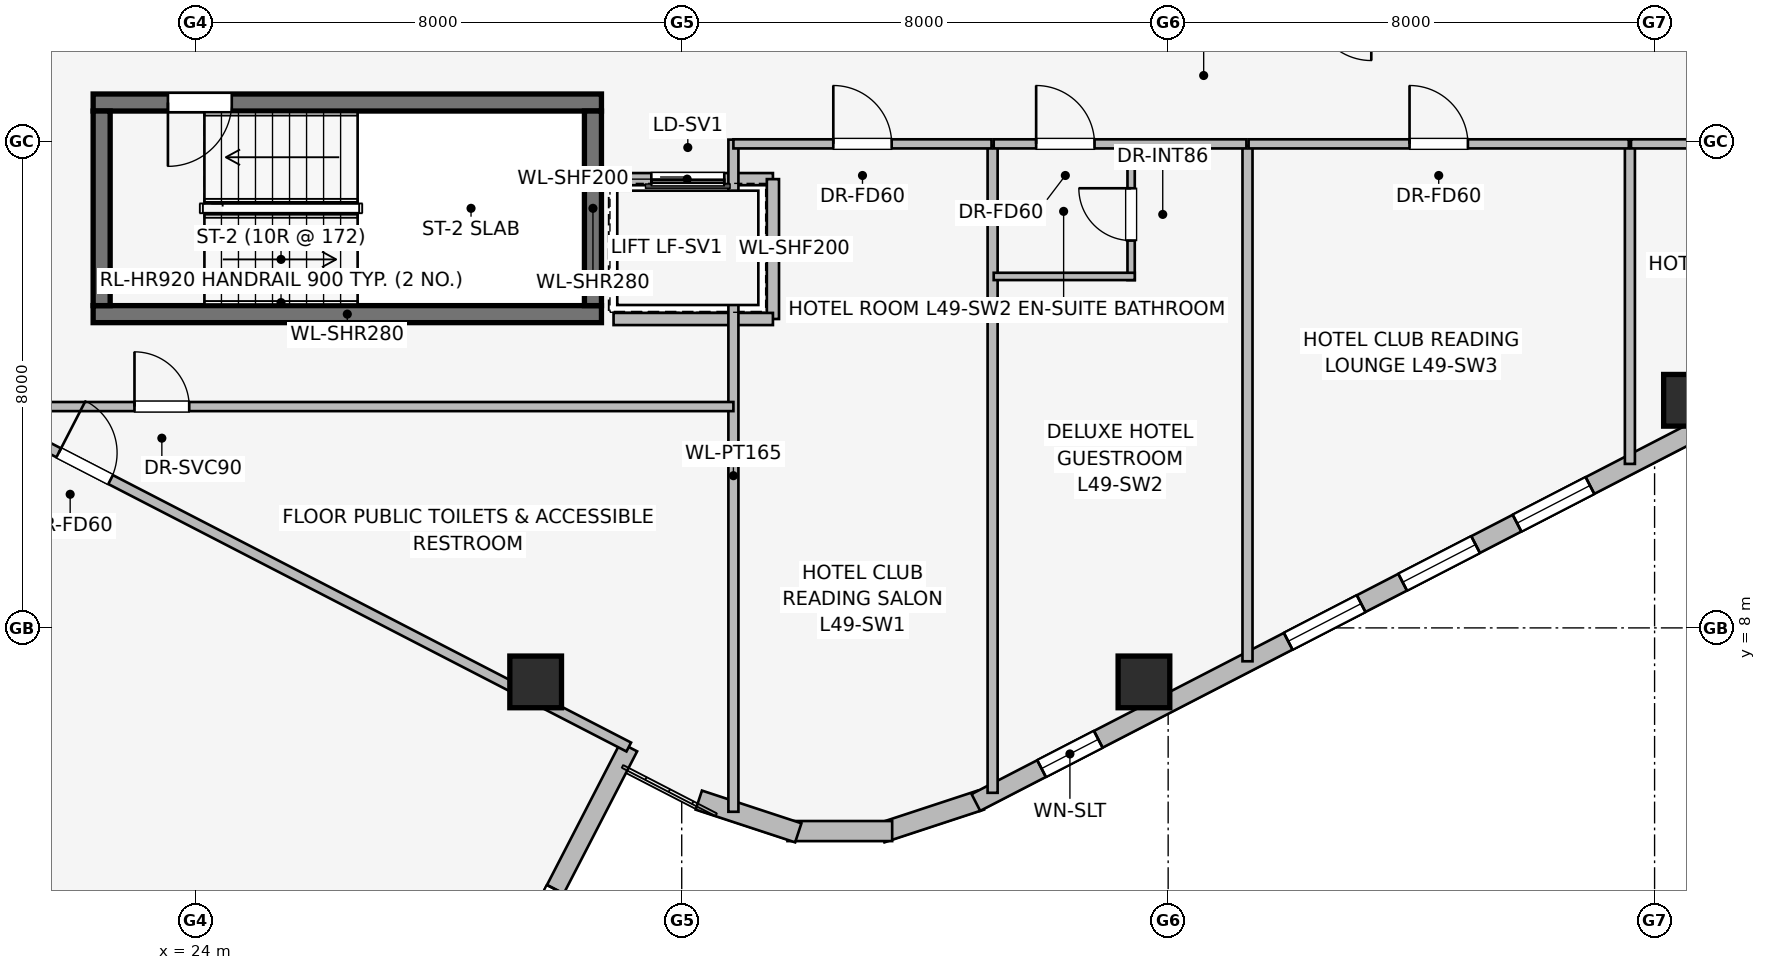
"""IFC4 building model, lengths in metres.
Left out: names, types, materials, properties, quantities, classifications, styles, units other than length and angle.
Written with IfcOpenShell. Run it as: python <this file> out.ifc"""

import sys

from ifc_helpers import new_model, si_unit, direction, frame, frame_2d, origin, origin_2d, place, context, subcontext, project, spatial, rectangle, extrude, element, fill, save


model = new_model("IFC4")
c1 = context("Model", 3, precision=1e-05, world=origin(), true_north=direction((0.0, 1.0)))
c2 = subcontext(c1, "Body", "Model", "MODEL_VIEW")
j1 = project(units=[si_unit("LENGTHUNIT", "METRE"), si_unit("PLANEANGLEUNIT", "RADIAN")], contexts=[c1])
p1 = place(None, origin())
s1 = spatial("IfcSite", under=j1, at=p1, CompositionType="ELEMENT")
p2 = place(p1, origin())
s2 = spatial("IfcBuilding", under=s1, at=p2, CompositionType="ELEMENT")
p3 = place(p2, frame((0.0, 0.0, 180.9)))
s3 = spatial("IfcBuildingStorey", under=s2, at=p3, CompositionType="ELEMENT", Elevation=180.9)
p4 = place(p3, frame((22.32, 13.16, 0.0), z_axis=(0.0, 0.0, 1.0), x_axis=(1.0, 0.0, 0.0)))
e1 = element("IfcWall", 1, at=p4, inside=s3, PredefinedType="SHEAR", context=c2, shape_type="SweptSolid", body=[
    extrude(rectangle(XDim=8.36, YDim=0.28, at=frame_2d((4.18, 0.0))), origin(), (0.0, 0.0, 1.0), 3.45),
])
p5 = place(p3, frame((30.68, 16.64, 0.0), z_axis=(0.0, 0.0, 1.0), x_axis=(-1.0, 0.0, 0.0)))
e2 = element("IfcWall", 2, at=p5, inside=s3, PredefinedType="SHEAR", context=c2, shape_type="SweptSolid", body=[
    extrude(rectangle(XDim=8.36, YDim=0.28, at=frame_2d((4.18, 0.0))), origin(), (0.0, 0.0, 1.0), 3.45),
])
p6 = place(p5, frame((6.08, 0.0, 0.0)))
e3 = element("IfcOpeningElement", 3, at=p6, cuts=e2, PredefinedType="OPENING", context=c2, shape_type="SweptSolid", body=[
    extrude(rectangle(XDim=1.05, YDim=2.0, at=frame_2d((0.525, 1.0))), frame((0.0, 0.15, 0.0), z_axis=(0.0, -1.0, 0.0), x_axis=(1.0, 0.0, 0.0)), (0.0, 0.0, 1.0), 0.3),
])
for number, where, z_axis, x_axis in (
    (4, (22.46, 16.5, 0.0), (0.0, 0.0, 1.0), (0.0, -1.0, 0.0)),
    (5, (30.54, 13.3, 0.0), (0.0, 0.0, 1.0), (0.0, 1.0, 0.0)),
):
    element("IfcWall", number, at=place(p3, frame(where, z_axis=z_axis, x_axis=x_axis)), inside=s3, PredefinedType="SHEAR", context=c2, shape_type="SweptSolid", body=[
        extrude(rectangle(XDim=3.2, YDim=0.28, at=frame_2d((1.6, 0.0))), origin(), (0.0, 0.0, 1.0), 3.45),
    ])
for number, where, z_axis, x_axis in (
    (6, (29.598, 7.112, 0.0), (0.0, 0.0, 1.0), (1.0, 0.0, 0.0)),
    (7, (39.602, 7.112, 0.0), (0.0, 0.0, 1.0), (1.0, 0.0, 0.0)),
    (8, (48.574, 11.743, 0.0), (0.0, 0.0, 1.0), (1.0, 0.0, 0.0)),
):
    element("IfcColumn", number, at=place(p3, frame(where, z_axis=z_axis, x_axis=x_axis)), inside=s3, PredefinedType="COLUMN", context=c2, shape_type="SweptSolid", body=[
        extrude(rectangle(XDim=0.85, YDim=0.85, at=origin_2d()), origin(), (0.0, 0.0, 1.0), 3.45),
    ])
p7 = place(p3, frame((31.129, 6.041, 0.0), z_axis=(0.0, 0.0, 1.0), x_axis=(-0.458626737826, -0.88862900884, 0.0)))
e9 = element("IfcWall", 9, at=p7, inside=s3, PredefinedType="STANDARD", context=c2, shape_type="SweptSolid", body=[
    extrude(rectangle(XDim=19.6, YDim=0.31, at=frame_2d((9.8, 0.0))), origin(), (0.0, 0.0, 1.0), 3.19),
])
p8 = place(p7, frame((2.633, 0.0, 0.75)))
e10 = element("IfcOpeningElement", 10, at=p8, cuts=e9, PredefinedType="OPENING", context=c2, shape_type="SweptSolid", body=[
    extrude(rectangle(XDim=2.0, YDim=1.5, at=frame_2d((1.0, 0.75))), frame((0.0, 0.165, 0.0), z_axis=(0.0, -1.0, 0.0), x_axis=(1.0, 0.0, 0.0)), (0.0, 0.0, 1.0), 0.33),
])
p9 = place(p7, frame((8.8, 0.0, 0.75)))
e11 = element("IfcOpeningElement", 11, at=p9, cuts=e9, PredefinedType="OPENING", context=c2, shape_type="SweptSolid", body=[
    extrude(rectangle(XDim=2.0, YDim=1.5, at=frame_2d((1.0, 0.75))), frame((0.0, 0.165, 0.0), z_axis=(0.0, -1.0, 0.0), x_axis=(1.0, 0.0, 0.0)), (0.0, 0.0, 1.0), 0.33),
])
p10 = place(p7, frame((14.967, 0.0, 0.75)))
e12 = element("IfcOpeningElement", 12, at=p10, cuts=e9, PredefinedType="OPENING", context=c2, shape_type="SweptSolid", body=[
    extrude(rectangle(XDim=2.0, YDim=1.5, at=frame_2d((1.0, 0.75))), frame((0.0, 0.165, 0.0), z_axis=(0.0, -1.0, 0.0), x_axis=(1.0, 0.0, 0.0)), (0.0, 0.0, 1.0), 0.33),
])
p11 = place(p3, frame((36.919, 5.168, 0.0), z_axis=(0.0, 0.0, 1.0), x_axis=(-0.949937416267, -0.312440242569, 0.0)))
e13 = element("IfcWall", 13, at=p11, inside=s3, PredefinedType="STANDARD", context=c2, shape_type="SweptSolid", body=[
    extrude(rectangle(XDim=1.722, YDim=0.33, at=frame_2d((0.861, 0.0))), origin(), (0.0, 0.0, 1.0), 3.19),
])
p12 = place(p3, frame((35.461, 4.659, 0.0), z_axis=(0.0, 0.0, 1.0), x_axis=(-1.0, 0.0, 0.0)))
e14 = element("IfcWall", 14, at=p12, inside=s3, PredefinedType="STANDARD", context=c2, shape_type="SweptSolid", body=[
    extrude(rectangle(XDim=1.722, YDim=0.33, at=frame_2d((0.861, 0.0))), origin(), (0.0, 0.0, 1.0), 3.19),
])
p13 = place(p3, frame((33.917, 4.63, 0.0), z_axis=(0.0, 0.0, 1.0), x_axis=(-0.949937416267, 0.312440242569, 0.0)))
e15 = element("IfcWall", 15, at=p13, inside=s3, PredefinedType="STANDARD", context=c2, shape_type="SweptSolid", body=[
    extrude(rectangle(XDim=1.722, YDim=0.33, at=frame_2d((0.861, 0.0))), origin(), (0.0, 0.0, 1.0), 3.19),
])
p14 = place(p3, frame((51.792, 12.847, 0.0), z_axis=(0.0, 0.0, 1.0), x_axis=(-0.888626188278, -0.458632202867, 0.0)))
e16 = element("IfcWall", 16, at=p14, inside=s3, PredefinedType="STANDARD", context=c2, shape_type="SweptSolid", body=[
    extrude(rectangle(XDim=16.828, YDim=0.31, at=frame_2d((8.414, 0.0))), origin(), (0.0, 0.0, 1.0), 3.19),
])
p15 = place(p14, frame((0.675, 0.0, 0.75)))
e17 = element("IfcOpeningElement", 17, at=p15, cuts=e16, PredefinedType="OPENING", context=c2, shape_type="SweptSolid", body=[
    extrude(rectangle(XDim=2.0, YDim=1.5, at=frame_2d((1.0, 0.75))), frame((0.0, 0.165, 0.0), z_axis=(0.0, -1.0, 0.0), x_axis=(1.0, 0.0, 0.0)), (0.0, 0.0, 1.0), 0.33),
])
p16 = place(p14, frame((5.463, 0.0, 0.75)))
e18 = element("IfcOpeningElement", 18, at=p16, cuts=e16, PredefinedType="OPENING", context=c2, shape_type="SweptSolid", body=[
    extrude(rectangle(XDim=1.35, YDim=1.45, at=frame_2d((0.675, 0.725))), frame((0.0, 0.165, 0.0), z_axis=(0.0, -1.0, 0.0), x_axis=(1.0, 0.0, 0.0)), (0.0, 0.0, 1.0), 0.33),
])
p17 = place(p14, frame((7.58, 0.0, 0.75)))
e19 = element("IfcOpeningElement", 19, at=p17, cuts=e16, PredefinedType="OPENING", context=c2, shape_type="SweptSolid", body=[
    extrude(rectangle(XDim=1.35, YDim=1.45, at=frame_2d((0.675, 0.725))), frame((0.0, 0.165, 0.0), z_axis=(0.0, -1.0, 0.0), x_axis=(1.0, 0.0, 0.0)), (0.0, 0.0, 1.0), 0.33),
])
p18 = place(p14, frame((9.698, 0.0, 0.75)))
e20 = element("IfcOpeningElement", 20, at=p18, cuts=e16, PredefinedType="OPENING", context=c2, shape_type="SweptSolid", body=[
    extrude(rectangle(XDim=1.35, YDim=1.45, at=frame_2d((0.675, 0.725))), frame((0.0, 0.165, 0.0), z_axis=(0.0, -1.0, 0.0), x_axis=(1.0, 0.0, 0.0)), (0.0, 0.0, 1.0), 0.33),
])
p19 = place(p14, frame((14.563, 0.0, 0.75)))
e21 = element("IfcOpeningElement", 21, at=p19, cuts=e16, PredefinedType="OPENING", context=c2, shape_type="SweptSolid", body=[
    extrude(rectangle(XDim=1.05, YDim=1.4, at=frame_2d((0.525, 0.7))), frame((0.0, 0.165, 0.0), z_axis=(0.0, -1.0, 0.0), x_axis=(1.0, 0.0, 0.0)), (0.0, 0.0, 1.0), 0.33),
])
p20 = place(p3, frame((33.5, 15.38, 0.0), z_axis=(0.0, 0.0, 1.0), x_axis=(-1.0, 0.0, 0.0)))
e22 = element("IfcWall", 22, at=p20, inside=s3, PredefinedType="PARTITIONING", context=c2, shape_type="SweptSolid", body=[
    extrude(rectangle(XDim=2.82, YDim=0.2, at=frame_2d((1.41, 0.0))), origin(), (0.0, 0.0, 1.0), 3.19),
])
p21 = place(p20, frame((0.8, 0.0, 0.0)))
e23 = element("IfcOpeningElement", 23, at=p21, cuts=e22, PredefinedType="OPENING", context=c2, shape_type="SweptSolid", body=[
    extrude(rectangle(XDim=1.2, YDim=2.2, at=frame_2d((0.6, 1.1))), frame((0.0, 0.11, 0.0), z_axis=(0.0, -1.0, 0.0), x_axis=(1.0, 0.0, 0.0)), (0.0, 0.0, 1.0), 0.22),
])
p22 = place(p3, frame((33.5, 13.08, 0.0), z_axis=(0.0, 0.0, 1.0), x_axis=(0.0, 1.0, 0.0)))
e24 = element("IfcWall", 24, at=p22, inside=s3, PredefinedType="PARTITIONING", context=c2, shape_type="SweptSolid", body=[
    extrude(rectangle(XDim=2.3, YDim=0.2, at=frame_2d((1.15, 0.0))), origin(), (0.0, 0.0, 1.0), 3.19),
])
p23 = place(p3, frame((30.879, 13.08, 0.0), z_axis=(0.0, 0.0, 1.0), x_axis=(1.0, 0.0, 0.0)))
e25 = element("IfcWall", 25, at=p23, inside=s3, PredefinedType="PARTITIONING", context=c2, shape_type="SweptSolid", body=[
    extrude(rectangle(XDim=2.621, YDim=0.2, at=frame_2d((1.311, 0.0))), origin(), (0.0, 0.0, 1.0), 3.19),
])
p24 = place(p3, frame((32.85, 4.976, 0.0), z_axis=(0.0, 0.0, 1.0), x_axis=(0.0, 1.0, 0.0)))
e26 = element("IfcWall", 26, at=p24, inside=s3, PredefinedType="PARTITIONING", context=c2, shape_type="SweptSolid", body=[
    extrude(rectangle(XDim=11.054, YDim=0.165, at=frame_2d((5.527, 0.0))), origin(), (0.0, 0.0, 1.0), 3.19),
])
p25 = place(p3, frame((21.1, 11.64, 0.0), z_axis=(0.0, 0.0, 1.0), x_axis=(1.0, 0.0, 0.0)))
e27 = element("IfcWall", 27, at=p25, inside=s3, PredefinedType="PARTITIONING", context=c2, shape_type="SweptSolid", body=[
    extrude(rectangle(XDim=11.75, YDim=0.15, at=frame_2d((5.875, 0.0))), origin(), (0.0, 0.0, 1.0), 3.19),
])
p26 = place(p25, frame((1.9, 0.0, 0.0)))
e28 = element("IfcOpeningElement", 28, at=p26, cuts=e27, PredefinedType="OPENING", context=c2, shape_type="SweptSolid", body=[
    extrude(rectangle(XDim=0.9, YDim=2.0, at=frame_2d((0.45, 1.0))), frame((0.0, 0.085, 0.0), z_axis=(0.0, -1.0, 0.0), x_axis=(1.0, 0.0, 0.0)), (0.0, 0.0, 1.0), 0.17),
])
p27 = place(p3, frame((37.113, 5.288, 0.0), z_axis=(0.0, 0.0, 1.0), x_axis=(0.0, 1.0, 0.0)))
e29 = element("IfcWall", 29, at=p27, inside=s3, PredefinedType="PARTITIONING", context=c2, shape_type="SweptSolid", body=[
    extrude(rectangle(XDim=10.642, YDim=0.165, at=frame_2d((5.321, 0.0))), origin(), (0.0, 0.0, 1.0), 3.19),
])
p28 = place(p3, frame((41.305, 7.451, 0.0), z_axis=(0.0, 0.0, 1.0), x_axis=(0.0, 1.0, 0.0)))
e30 = element("IfcWall", 30, at=p28, inside=s3, PredefinedType="PARTITIONING", context=c2, shape_type="SweptSolid", body=[
    extrude(rectangle(XDim=8.479, YDim=0.165, at=frame_2d((4.24, 0.0))), origin(), (0.0, 0.0, 1.0), 3.19),
])
p29 = place(p3, frame((47.594, 10.697, 0.0), z_axis=(0.0, 0.0, 1.0), x_axis=(0.0, 1.0, 0.0)))
e31 = element("IfcWall", 31, at=p29, inside=s3, PredefinedType="PARTITIONING", context=c2, shape_type="SweptSolid", body=[
    extrude(rectangle(XDim=5.233, YDim=0.165, at=frame_2d((2.616, 0.0))), origin(), (0.0, 0.0, 1.0), 3.19),
])
p30 = place(p3, frame((32.85, 15.96, 0.0), z_axis=(0.0, 0.0, 1.0), x_axis=(1.0, 0.0, 0.0)))
e32 = element("IfcWall", 32, at=p30, inside=s3, PredefinedType="PARTITIONING", context=c2, shape_type="SweptSolid", body=[
    extrude(rectangle(XDim=4.245, YDim=0.15, at=frame_2d((2.123, 0.0))), origin(), (0.0, 0.0, 1.0), 3.19),
])
p31 = place(p30, frame((1.643, 0.0, 0.0)))
e33 = element("IfcOpeningElement", 33, at=p31, cuts=e32, PredefinedType="OPENING", context=c2, shape_type="SweptSolid", body=[
    extrude(rectangle(XDim=0.96, YDim=2.0, at=frame_2d((0.48, 1.0))), frame((0.0, 0.085, 0.0), z_axis=(0.0, -1.0, 0.0), x_axis=(1.0, 0.0, 0.0)), (0.0, 0.0, 1.0), 0.17),
])
p32 = place(p3, frame((39.391, 13.72, 0.0), z_axis=(0.0, 0.0, 1.0), x_axis=(0.0, 1.0, 0.0)))
e34 = element("IfcWall", 34, at=p32, inside=s3, PredefinedType="PARTITIONING", context=c2, shape_type="SweptSolid", body=[
    extrude(rectangle(XDim=2.24, YDim=0.12, at=frame_2d((1.12, 0.0))), origin(), (0.0, 0.0, 1.0), 2.497),
])
p33 = place(p32, frame((0.65, 0.0, 0.0)))
e35 = element("IfcOpeningElement", 35, at=p33, cuts=e34, PredefinedType="OPENING", context=c2, shape_type="SweptSolid", body=[
    extrude(rectangle(XDim=0.86, YDim=2.0, at=frame_2d((0.43, 1.0))), frame((0.0, 0.07, 0.0), z_axis=(0.0, -1.0, 0.0), x_axis=(1.0, 0.0, 0.0)), (0.0, 0.0, 1.0), 0.14),
])
p34 = place(p3, frame((37.131, 13.78, 0.0), z_axis=(0.0, 0.0, 1.0), x_axis=(1.0, 0.0, 0.0)))
e36 = element("IfcWall", 36, at=p34, inside=s3, PredefinedType="PARTITIONING", context=c2, shape_type="SweptSolid", body=[
    extrude(rectangle(XDim=2.32, YDim=0.12, at=frame_2d((1.16, 0.0))), origin(), (0.0, 0.0, 1.0), 3.19),
])
p35 = place(p3, frame((37.131, 15.96, 0.0), z_axis=(0.0, 0.0, 1.0), x_axis=(1.0, 0.0, 0.0)))
e37 = element("IfcWall", 37, at=p35, inside=s3, PredefinedType="PARTITIONING", context=c2, shape_type="SweptSolid", body=[
    extrude(rectangle(XDim=4.156, YDim=0.15, at=frame_2d((2.078, 0.0))), origin(), (0.0, 0.0, 1.0), 3.19),
])
p36 = place(p35, frame((0.698, 0.0, 0.0)))
e38 = element("IfcOpeningElement", 38, at=p36, cuts=e37, PredefinedType="OPENING", context=c2, shape_type="SweptSolid", body=[
    extrude(rectangle(XDim=0.96, YDim=2.0, at=frame_2d((0.48, 1.0))), frame((0.0, 0.085, 0.0), z_axis=(0.0, -1.0, 0.0), x_axis=(1.0, 0.0, 0.0)), (0.0, 0.0, 1.0), 0.17),
])
p37 = place(p3, frame((41.323, 15.96, 0.0), z_axis=(0.0, 0.0, 1.0), x_axis=(1.0, 0.0, 0.0)))
e39 = element("IfcWall", 39, at=p37, inside=s3, PredefinedType="PARTITIONING", context=c2, shape_type="SweptSolid", body=[
    extrude(rectangle(XDim=6.253, YDim=0.15, at=frame_2d((3.126, 0.0))), origin(), (0.0, 0.0, 1.0), 3.19),
])
p38 = place(p37, frame((2.647, 0.0, 0.0)))
e40 = element("IfcOpeningElement", 40, at=p38, cuts=e39, PredefinedType="OPENING", context=c2, shape_type="SweptSolid", body=[
    extrude(rectangle(XDim=0.96, YDim=2.0, at=frame_2d((0.48, 1.0))), frame((0.0, 0.085, 0.0), z_axis=(0.0, -1.0, 0.0), x_axis=(1.0, 0.0, 0.0)), (0.0, 0.0, 1.0), 0.17),
])
p39 = place(p3, frame((47.612, 15.96, 0.0), z_axis=(0.0, 0.0, 1.0), x_axis=(1.0, 0.0, 0.0)))
e41 = element("IfcWall", 41, at=p39, inside=s3, PredefinedType="PARTITIONING", context=c2, shape_type="SweptSolid", body=[
    extrude(rectangle(XDim=6.451, YDim=0.15, at=frame_2d((3.226, 0.0))), origin(), (0.0, 0.0, 1.0), 3.19),
])
p40 = place(p39, frame((2.814, 0.0, 0.0)))
e42 = element("IfcOpeningElement", 42, at=p40, cuts=e41, PredefinedType="OPENING", context=c2, shape_type="SweptSolid", body=[
    extrude(rectangle(XDim=0.96, YDim=2.0, at=frame_2d((0.48, 1.0))), frame((0.0, 0.085, 0.0), z_axis=(0.0, -1.0, 0.0), x_axis=(1.0, 0.0, 0.0)), (0.0, 0.0, 1.0), 0.17),
])
p41 = place(p3, frame((18.866, 12.37, 0.0), z_axis=(0.0, 0.0, 1.0), x_axis=(0.888625308836, -0.458633906832, 0.0)))
e43 = element("IfcWall", 43, at=p41, inside=s3, PredefinedType="PARTITIONING", context=c2, shape_type="SweptSolid", body=[
    extrude(rectangle(XDim=13.8, YDim=0.165, at=frame_2d((6.9, 0.0))), origin(), (0.0, 0.0, 1.0), 2.641),
])
p42 = place(p41, frame((3.25, 0.0, 0.0)))
e44 = element("IfcOpeningElement", 44, at=p42, cuts=e43, PredefinedType="OPENING", context=c2, shape_type="SweptSolid", body=[
    extrude(rectangle(XDim=0.96, YDim=2.0, at=frame_2d((0.48, 1.0))), frame((0.0, 0.093, 0.0), z_axis=(0.0, -1.0, 0.0), x_axis=(1.0, 0.0, 0.0)), (0.0, 0.0, 1.0), 0.185),
])
p43 = place(p8, origin())
e45 = element("IfcWindow", 45, at=p43, inside=s3, PartitioningType="SINGLE_PANEL", PredefinedType="WINDOW", context=c2, shape_type="SweptSolid", body=[
    extrude(rectangle(XDim=2.0, YDim=1.5, at=frame_2d((1.0, 0.75))), frame((0.0, 0.03, 0.0), z_axis=(0.0, -1.0, 0.0), x_axis=(1.0, 0.0, 0.0)), (0.0, 0.0, 1.0), 0.06),
])
fill(e10, e45)
p44 = place(p16, origin())
e46 = element("IfcWindow", 46, at=p44, inside=s3, PartitioningType="SINGLE_PANEL", PredefinedType="WINDOW", context=c2, shape_type="SweptSolid", body=[
    extrude(rectangle(XDim=1.35, YDim=1.45, at=frame_2d((0.675, 0.725))), frame((0.0, 0.03, 0.0), z_axis=(0.0, -1.0, 0.0), x_axis=(1.0, 0.0, 0.0)), (0.0, 0.0, 1.0), 0.06),
])
fill(e18, e46)
p45 = place(p17, origin())
e47 = element("IfcWindow", 47, at=p45, inside=s3, PartitioningType="SINGLE_PANEL", PredefinedType="WINDOW", context=c2, shape_type="SweptSolid", body=[
    extrude(rectangle(XDim=1.35, YDim=1.45, at=frame_2d((0.675, 0.725))), frame((0.0, 0.03, 0.0), z_axis=(0.0, -1.0, 0.0), x_axis=(1.0, 0.0, 0.0)), (0.0, 0.0, 1.0), 0.06),
])
fill(e19, e47)
p46 = place(p18, origin())
e48 = element("IfcWindow", 48, at=p46, inside=s3, PartitioningType="SINGLE_PANEL", PredefinedType="WINDOW", context=c2, shape_type="SweptSolid", body=[
    extrude(rectangle(XDim=1.35, YDim=1.45, at=frame_2d((0.675, 0.725))), frame((0.0, 0.03, 0.0), z_axis=(0.0, -1.0, 0.0), x_axis=(1.0, 0.0, 0.0)), (0.0, 0.0, 1.0), 0.06),
])
fill(e20, e48)
p47 = place(p19, origin())
e49 = element("IfcWindow", 49, at=p47, inside=s3, PartitioningType="SINGLE_PANEL", PredefinedType="WINDOW", context=c2, shape_type="SweptSolid", body=[
    extrude(rectangle(XDim=1.05, YDim=1.4, at=frame_2d((0.525, 0.7))), frame((0.0, 0.03, 0.0), z_axis=(0.0, -1.0, 0.0), x_axis=(1.0, 0.0, 0.0)), (0.0, 0.0, 1.0), 0.06),
])
fill(e21, e49)
p48 = place(p6, origin())
e50 = element("IfcDoor", 50, at=p48, inside=s3, OperationType="SINGLE_SWING_RIGHT", PredefinedType="DOOR", context=c2, shape_type="SweptSolid", body=[
    extrude(rectangle(XDim=1.05, YDim=2.0, at=frame_2d((0.525, 1.0))), frame((0.0, 0.025, 0.0), z_axis=(0.0, -1.0, 0.0), x_axis=(1.0, 0.0, 0.0)), (0.0, 0.0, 1.0), 0.05),
])
fill(e3, e50)
p49 = place(p21, origin())
e51 = element("IfcDoor", 51, at=p49, inside=s3, OperationType="SLIDING_TO_RIGHT", PredefinedType="DOOR", context=c2, shape_type="SweptSolid", body=[
    extrude(rectangle(XDim=1.2, YDim=2.2, at=frame_2d((0.6, 1.1))), frame((0.0, 0.025, 0.0), z_axis=(0.0, -1.0, 0.0), x_axis=(1.0, 0.0, 0.0)), (0.0, 0.0, 1.0), 0.05),
])
fill(e23, e51)
p50 = place(p26, origin())
e52 = element("IfcDoor", 52, at=p50, inside=s3, OperationType="SINGLE_SWING_LEFT", PredefinedType="DOOR", context=c2, shape_type="SweptSolid", body=[
    extrude(rectangle(XDim=0.9, YDim=2.0, at=frame_2d((0.45, 1.0))), frame((0.0, 0.025, 0.0), z_axis=(0.0, -1.0, 0.0), x_axis=(1.0, 0.0, 0.0)), (0.0, 0.0, 1.0), 0.05),
])
fill(e28, e52)
p51 = place(p31, origin())
e53 = element("IfcDoor", 53, at=p51, inside=s3, OperationType="SINGLE_SWING_LEFT", PredefinedType="DOOR", context=c2, shape_type="SweptSolid", body=[
    extrude(rectangle(XDim=0.96, YDim=2.0, at=frame_2d((0.48, 1.0))), frame((0.0, 0.025, 0.0), z_axis=(0.0, -1.0, 0.0), x_axis=(1.0, 0.0, 0.0)), (0.0, 0.0, 1.0), 0.05),
])
fill(e33, e53)
p52 = place(p33, origin())
e54 = element("IfcDoor", 54, at=p52, inside=s3, OperationType="SINGLE_SWING_RIGHT", PredefinedType="DOOR", context=c2, shape_type="SweptSolid", body=[
    extrude(rectangle(XDim=0.86, YDim=2.0, at=frame_2d((0.43, 1.0))), frame((0.0, 0.025, 0.0), z_axis=(0.0, -1.0, 0.0), x_axis=(1.0, 0.0, 0.0)), (0.0, 0.0, 1.0), 0.05),
])
fill(e35, e54)
p53 = place(p36, origin())
e55 = element("IfcDoor", 55, at=p53, inside=s3, OperationType="SINGLE_SWING_LEFT", PredefinedType="DOOR", context=c2, shape_type="SweptSolid", body=[
    extrude(rectangle(XDim=0.96, YDim=2.0, at=frame_2d((0.48, 1.0))), frame((0.0, 0.025, 0.0), z_axis=(0.0, -1.0, 0.0), x_axis=(1.0, 0.0, 0.0)), (0.0, 0.0, 1.0), 0.05),
])
fill(e38, e55)
p54 = place(p38, origin())
e56 = element("IfcDoor", 56, at=p54, inside=s3, OperationType="SINGLE_SWING_LEFT", PredefinedType="DOOR", context=c2, shape_type="SweptSolid", body=[
    extrude(rectangle(XDim=0.96, YDim=2.0, at=frame_2d((0.48, 1.0))), frame((0.0, 0.025, 0.0), z_axis=(0.0, -1.0, 0.0), x_axis=(1.0, 0.0, 0.0)), (0.0, 0.0, 1.0), 0.05),
])
fill(e40, e56)
p55 = place(p42, origin())
e57 = element("IfcDoor", 57, at=p55, inside=s3, OperationType="SINGLE_SWING_LEFT", PredefinedType="DOOR", context=c2, shape_type="SweptSolid", body=[
    extrude(rectangle(XDim=0.96, YDim=2.0, at=frame_2d((0.48, 1.0))), frame((0.0, 0.025, 0.0), z_axis=(0.0, -1.0, 0.0), x_axis=(1.0, 0.0, 0.0)), (0.0, 0.0, 1.0), 0.05),
])
fill(e44, e57)
save(model, sys.argv[1])
